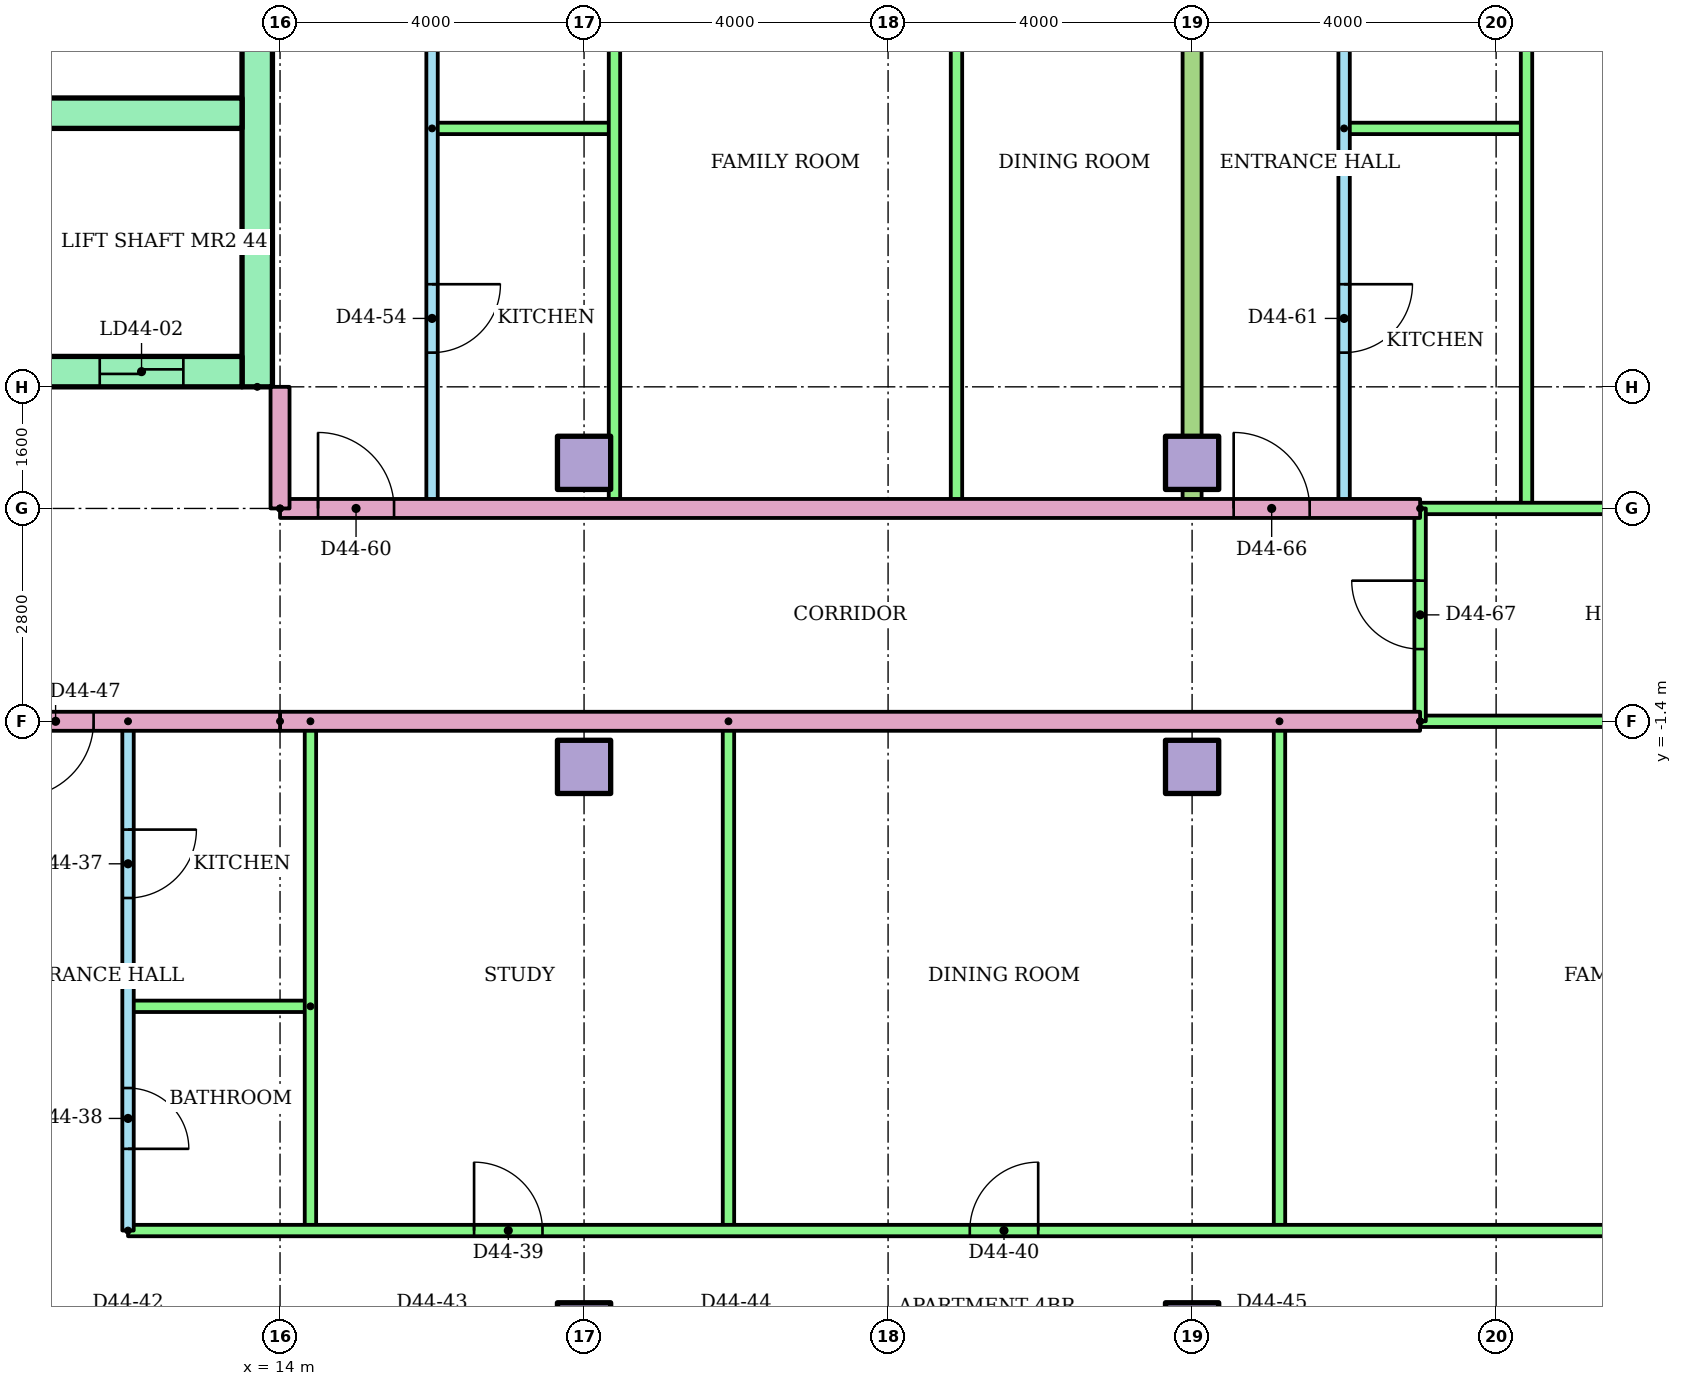
"""IFC4 building model, lengths in metres.
Left out: names, types, materials, properties, quantities, classifications, styles, units other than length and angle.
Written with IfcOpenShell. Run it as: python <this file> out.ifc"""

import sys

from ifc_helpers import new_model, si_unit, direction, frame, frame_2d, origin, origin_2d, place, context, subcontext, project, spatial, rectangle, extrude, element, fill, save


model = new_model("IFC4")
c1 = context("Model", 3, precision=1e-05, world=origin(), true_north=direction((0.0, 1.0)))
c2 = subcontext(c1, "Body", "Model", "MODEL_VIEW")
j1 = project(units=[si_unit("LENGTHUNIT", "METRE"), si_unit("PLANEANGLEUNIT", "RADIAN")], contexts=[c1])
p1 = place(None, origin())
s1 = spatial("IfcSite", under=j1, at=p1, CompositionType="ELEMENT")
p2 = place(p1, origin())
s2 = spatial("IfcBuilding", under=s1, at=p2, CompositionType="ELEMENT")
p3 = place(p2, frame((0.0, 0.0, 171.7)))
s3 = spatial("IfcBuildingStorey", under=s2, at=p3, CompositionType="ELEMENT", Elevation=171.7)
for number, where in (
    (1, (18.0, -9.4, 0.0)),
    (2, (26.0, -9.4, 0.0)),
    (3, (18.0, -2.0, 0.0)),
    (4, (26.0, -2.0, 0.0)),
    (5, (18.0, 2.0, 0.0)),
    (6, (26.0, 2.0, 0.0)),
):
    element("IfcColumn", number, at=place(p3, frame(where)), inside=s3, PredefinedType="COLUMN", context=c2, shape_type="SweptSolid", body=[
        extrude(rectangle(XDim=0.7, YDim=0.7, at=origin_2d()), origin(), (0.0, 0.0, 1.0), 3.2),
    ])
p4 = place(p3, frame((13.7, 3.0, 0.0), z_axis=(0.0, 0.0, 1.0), x_axis=(0.0, 1.0, 0.0)))
e7 = element("IfcWall", 7, at=p4, inside=s3, PredefinedType="SHEAR", context=c2, shape_type="SweptSolid", body=[
    extrude(rectangle(XDim=17.0, YDim=0.4, at=frame_2d((8.5, 0.0))), origin(), (0.0, 0.0, 1.0), 2.92),
])
p5 = place(p3, frame((-13.5, 3.2, 0.0)))
e8 = element("IfcWall", 8, at=p5, inside=s3, PredefinedType="SHEAR", context=c2, shape_type="SweptSolid", body=[
    extrude(rectangle(XDim=27.0, YDim=0.4, at=frame_2d((13.5, 0.0))), origin(), (0.0, 0.0, 1.0), 2.92),
])
p6 = place(p5, frame((22.083, 0.0, 0.0)))
e9 = element("IfcOpeningElement", 9, at=p6, cuts=e8, PredefinedType="OPENING", context=c2, shape_type="SweptSolid", body=[
    extrude(rectangle(XDim=1.1, YDim=2.1, at=frame_2d((0.55, 1.05))), frame((0.0, 0.21, 0.0), z_axis=(0.0, -1.0, 0.0), x_axis=(1.0, 0.0, 0.0)), (0.0, 0.0, 1.0), 0.42),
])
p7 = place(p5, frame((25.128, 0.0, 0.0)))
e10 = element("IfcOpeningElement", 10, at=p7, cuts=e8, PredefinedType="OPENING", context=c2, shape_type="SweptSolid", body=[
    extrude(rectangle(XDim=1.1, YDim=2.1, at=frame_2d((0.55, 1.05))), frame((0.0, 0.21, 0.0), z_axis=(0.0, -1.0, 0.0), x_axis=(1.0, 0.0, 0.0)), (0.0, 0.0, 1.0), 0.42),
])
p8 = place(p5, frame((12.6, 0.0, 0.0)))
e11 = element("IfcOpeningElement", 11, at=p8, cuts=e8, PredefinedType="OPENING", context=c2, shape_type="SweptSolid", body=[
    extrude(rectangle(XDim=1.8, YDim=2.1, at=frame_2d((0.9, 1.05))), frame((0.0, 0.21, 0.0), z_axis=(0.0, -1.0, 0.0), x_axis=(1.0, 0.0, 0.0)), (0.0, 0.0, 1.0), 0.42),
])
p9 = place(p3, frame((1.522, 6.6, 0.0)))
e12 = element("IfcWall", 12, at=p9, inside=s3, PredefinedType="SHEAR", context=c2, shape_type="SweptSolid", body=[
    extrude(rectangle(XDim=11.978, YDim=0.4, at=frame_2d((5.989, 0.0))), origin(), (0.0, 0.0, 1.0), 2.92),
])
p10 = place(p9, frame((1.022, 0.0, 0.0)))
e13 = element("IfcOpeningElement", 13, at=p10, cuts=e12, PredefinedType="OPENING", context=c2, shape_type="SweptSolid", body=[
    extrude(rectangle(XDim=1.0, YDim=2.1, at=frame_2d((0.5, 1.05))), frame((0.0, 0.21, 0.0), z_axis=(0.0, -1.0, 0.0), x_axis=(1.0, 0.0, 0.0)), (0.0, 0.0, 1.0), 0.42),
])
p11 = place(p9, frame((4.067, 0.0, 0.0)))
e14 = element("IfcOpeningElement", 14, at=p11, cuts=e12, PredefinedType="OPENING", context=c2, shape_type="SweptSolid", body=[
    extrude(rectangle(XDim=1.0, YDim=2.1, at=frame_2d((0.5, 1.05))), frame((0.0, 0.21, 0.0), z_axis=(0.0, -1.0, 0.0), x_axis=(1.0, 0.0, 0.0)), (0.0, 0.0, 1.0), 0.42),
])
p12 = place(p3, frame((12.0, -1.4, 0.0), z_axis=(0.0, 0.0, 1.0), x_axis=(0.0, -1.0, 0.0)))
e15 = element("IfcWall", 15, at=p12, inside=s3, PredefinedType="PARTITIONING", context=c2, shape_type="SweptSolid", body=[
    extrude(rectangle(XDim=6.7, YDim=0.15, at=frame_2d((3.35, 0.0))), origin(), (0.0, 0.0, 1.0), 2.4),
])
p13 = place(p12, frame((1.425, 0.0, 0.0)))
e16 = element("IfcOpeningElement", 16, at=p13, cuts=e15, PredefinedType="OPENING", context=c2, shape_type="SweptSolid", body=[
    extrude(rectangle(XDim=0.9, YDim=2.1, at=frame_2d((0.45, 1.05))), frame((0.0, 0.085, 0.0), z_axis=(0.0, -1.0, 0.0), x_axis=(1.0, 0.0, 0.0)), (0.0, 0.0, 1.0), 0.17),
])
p14 = place(p12, frame((4.825, 0.0, 0.0)))
e17 = element("IfcOpeningElement", 17, at=p14, cuts=e15, PredefinedType="OPENING", context=c2, shape_type="SweptSolid", body=[
    extrude(rectangle(XDim=0.8, YDim=2.1, at=frame_2d((0.4, 1.05))), frame((0.0, 0.085, 0.0), z_axis=(0.0, -1.0, 0.0), x_axis=(1.0, 0.0, 0.0)), (0.0, 0.0, 1.0), 0.17),
])
p15 = place(p3, frame((14.4, -5.15, 0.0), z_axis=(0.0, 0.0, 1.0), x_axis=(-1.0, 0.0, 0.0)))
e18 = element("IfcWall", 18, at=p15, inside=s3, PredefinedType="PARTITIONING", context=c2, shape_type="SweptSolid", body=[
    extrude(rectangle(XDim=2.4, YDim=0.15, at=frame_2d((1.2, 0.0))), origin(), (0.0, 0.0, 1.0), 2.4),
])
for number, where, z_axis, x_axis in (
    (19, (14.4, -1.4, 0.0), (0.0, 0.0, 1.0), (0.0, -1.0, 0.0)),
    (20, (19.9, -1.4, 0.0), (0.0, 0.0, 1.0), (0.0, -1.0, 0.0)),
    (21, (27.15, -1.4, 0.0), (0.0, 0.0, 1.0), (0.0, -1.0, 0.0)),
):
    element("IfcWall", number, at=place(p3, frame(where, z_axis=z_axis, x_axis=x_axis)), inside=s3, PredefinedType="PARTITIONING", context=c2, shape_type="SweptSolid", body=[
        extrude(rectangle(XDim=6.7, YDim=0.15, at=frame_2d((3.35, 0.0))), origin(), (0.0, 0.0, 1.0), 2.4),
    ])
p16 = place(p3, frame((12.0, -8.1, 0.0)))
e22 = element("IfcWall", 22, at=p16, inside=s3, PredefinedType="PARTITIONING", context=c2, shape_type="SweptSolid", body=[
    extrude(rectangle(XDim=24.82, YDim=0.15, at=frame_2d((12.41, 0.0))), origin(), (0.0, 0.0, 1.0), 2.4),
])
p17 = place(p16, frame((4.553, 0.0, 0.0)))
e23 = element("IfcOpeningElement", 23, at=p17, cuts=e22, PredefinedType="OPENING", context=c2, shape_type="SweptSolid", body=[
    extrude(rectangle(XDim=0.9, YDim=2.1, at=frame_2d((0.45, 1.05))), frame((0.0, 0.085, 0.0), z_axis=(0.0, -1.0, 0.0), x_axis=(1.0, 0.0, 0.0)), (0.0, 0.0, 1.0), 0.17),
])
p18 = place(p16, frame((11.075, 0.0, 0.0)))
e24 = element("IfcOpeningElement", 24, at=p18, cuts=e22, PredefinedType="OPENING", context=c2, shape_type="SweptSolid", body=[
    extrude(rectangle(XDim=0.9, YDim=2.1, at=frame_2d((0.45, 1.05))), frame((0.0, 0.085, 0.0), z_axis=(0.0, -1.0, 0.0), x_axis=(1.0, 0.0, 0.0)), (0.0, 0.0, 1.0), 0.17),
])
p19 = place(p16, frame((19.425, 0.0, 0.0)))
e25 = element("IfcOpeningElement", 25, at=p19, cuts=e22, PredefinedType="OPENING", context=c2, shape_type="SweptSolid", body=[
    extrude(rectangle(XDim=0.9, YDim=2.1, at=frame_2d((0.45, 1.05))), frame((0.0, 0.085, 0.0), z_axis=(0.0, -1.0, 0.0), x_axis=(1.0, 0.0, 0.0)), (0.0, 0.0, 1.0), 0.17),
])
p20 = place(p3, frame((29.0, -1.4, 0.0), z_axis=(0.0, 0.0, 1.0), x_axis=(-1.0, 0.0, 0.0)))
e26 = element("IfcWall", 26, at=p20, inside=s3, PredefinedType="PARTITIONING", context=c2, shape_type="SweptSolid", body=[
    extrude(rectangle(XDim=15.0, YDim=0.25, at=frame_2d((7.5, 0.0))), origin(), (0.0, 0.0, 1.0), 2.4),
])
p21 = place(p3, frame((36.82, -1.4, 0.0), z_axis=(0.0, 0.0, 1.0), x_axis=(-1.0, 0.0, 0.0)))
e27 = element("IfcWall", 27, at=p21, inside=s3, PredefinedType="PARTITIONING", context=c2, shape_type="SweptSolid", body=[
    extrude(rectangle(XDim=7.82, YDim=0.15, at=frame_2d((3.91, 0.0))), origin(), (0.0, 0.0, 1.0), 2.4),
])
p22 = place(p3, frame((16.0, 10.5, 0.0), z_axis=(0.0, 0.0, 1.0), x_axis=(0.0, -1.0, 0.0)))
e28 = element("IfcWall", 28, at=p22, inside=s3, PredefinedType="PARTITIONING", context=c2, shape_type="SweptSolid", body=[
    extrude(rectangle(XDim=9.1, YDim=0.15, at=frame_2d((4.55, 0.0))), origin(), (0.0, 0.0, 1.0), 2.4),
])
p23 = place(p22, frame((6.15, 0.0, 0.0)))
e29 = element("IfcOpeningElement", 29, at=p23, cuts=e28, PredefinedType="OPENING", context=c2, shape_type="SweptSolid", body=[
    extrude(rectangle(XDim=0.9, YDim=2.1, at=frame_2d((0.45, 1.05))), frame((0.0, 0.085, 0.0), z_axis=(0.0, -1.0, 0.0), x_axis=(1.0, 0.0, 0.0)), (0.0, 0.0, 1.0), 0.17),
])
p24 = place(p22, frame((1.65, 0.0, 0.0)))
e30 = element("IfcOpeningElement", 30, at=p24, cuts=e28, PredefinedType="OPENING", context=c2, shape_type="SweptSolid", body=[
    extrude(rectangle(XDim=0.8, YDim=2.1, at=frame_2d((0.4, 1.05))), frame((0.0, 0.085, 0.0), z_axis=(0.0, -1.0, 0.0), x_axis=(1.0, 0.0, 0.0)), (0.0, 0.0, 1.0), 0.17),
])
p25 = place(p3, frame((16.0, 6.4, 0.0)))
e31 = element("IfcWall", 31, at=p25, inside=s3, PredefinedType="PARTITIONING", context=c2, shape_type="SweptSolid", body=[
    extrude(rectangle(XDim=2.4, YDim=0.15, at=frame_2d((1.2, 0.0))), origin(), (0.0, 0.0, 1.0), 2.4),
])
for number, where, z_axis, x_axis in (
    (32, (18.4, 10.5, 0.0), (0.0, 0.0, 1.0), (0.0, -1.0, 0.0)),
    (33, (22.9, 10.5, 0.0), (0.0, 0.0, 1.0), (0.0, -1.0, 0.0)),
):
    element("IfcWall", number, at=place(p3, frame(where, z_axis=z_axis, x_axis=x_axis)), inside=s3, PredefinedType="PARTITIONING", context=c2, shape_type="SweptSolid", body=[
        extrude(rectangle(XDim=9.1, YDim=0.15, at=frame_2d((4.55, 0.0))), origin(), (0.0, 0.0, 1.0), 2.4),
    ])
p26 = place(p3, frame((28.0, 10.5, 0.0), z_axis=(0.0, 0.0, 1.0), x_axis=(0.0, -1.0, 0.0)))
e34 = element("IfcWall", 34, at=p26, inside=s3, PredefinedType="PARTITIONING", context=c2, shape_type="SweptSolid", body=[
    extrude(rectangle(XDim=9.1, YDim=0.15, at=frame_2d((4.55, 0.0))), origin(), (0.0, 0.0, 1.0), 2.4),
])
p27 = place(p26, frame((6.15, 0.0, 0.0)))
e35 = element("IfcOpeningElement", 35, at=p27, cuts=e34, PredefinedType="OPENING", context=c2, shape_type="SweptSolid", body=[
    extrude(rectangle(XDim=0.9, YDim=2.1, at=frame_2d((0.45, 1.05))), frame((0.0, 0.085, 0.0), z_axis=(0.0, -1.0, 0.0), x_axis=(1.0, 0.0, 0.0)), (0.0, 0.0, 1.0), 0.17),
])
p28 = place(p26, frame((1.65, 0.0, 0.0)))
e36 = element("IfcOpeningElement", 36, at=p28, cuts=e34, PredefinedType="OPENING", context=c2, shape_type="SweptSolid", body=[
    extrude(rectangle(XDim=0.8, YDim=2.1, at=frame_2d((0.4, 1.05))), frame((0.0, 0.085, 0.0), z_axis=(0.0, -1.0, 0.0), x_axis=(1.0, 0.0, 0.0)), (0.0, 0.0, 1.0), 0.17),
])
p29 = place(p3, frame((28.0, 6.4, 0.0)))
e37 = element("IfcWall", 37, at=p29, inside=s3, PredefinedType="PARTITIONING", context=c2, shape_type="SweptSolid", body=[
    extrude(rectangle(XDim=2.4, YDim=0.15, at=frame_2d((1.2, 0.0))), origin(), (0.0, 0.0, 1.0), 2.4),
])
p30 = place(p3, frame((30.4, 10.5, 0.0), z_axis=(0.0, 0.0, 1.0), x_axis=(0.0, -1.0, 0.0)))
e38 = element("IfcWall", 38, at=p30, inside=s3, PredefinedType="PARTITIONING", context=c2, shape_type="SweptSolid", body=[
    extrude(rectangle(XDim=9.1, YDim=0.15, at=frame_2d((4.55, 0.0))), origin(), (0.0, 0.0, 1.0), 2.4),
])
p31 = place(p3, frame((26.0, 18.821, 0.0), z_axis=(0.0, 0.0, 1.0), x_axis=(0.0, -1.0, 0.0)))
e39 = element("IfcWall", 39, at=p31, inside=s3, PredefinedType="PARTITIONING", context=c2, shape_type="SweptSolid", body=[
    extrude(rectangle(XDim=17.421, YDim=0.25, at=frame_2d((8.71, 0.0))), origin(), (0.0, 0.0, 1.0), 2.4),
])
p32 = place(p3, frame((14.0, 1.4, 0.0)))
e40 = element("IfcWall", 40, at=p32, inside=s3, PredefinedType="PARTITIONING", context=c2, shape_type="SweptSolid", body=[
    extrude(rectangle(XDim=15.0, YDim=0.25, at=frame_2d((7.5, 0.0))), origin(), (0.0, 0.0, 1.0), 2.4),
])
p33 = place(p32, frame((0.5, 0.0, 0.0)))
e41 = element("IfcOpeningElement", 41, at=p33, cuts=e40, PredefinedType="OPENING", context=c2, shape_type="SweptSolid", body=[
    extrude(rectangle(XDim=1.0, YDim=2.1, at=frame_2d((0.5, 1.05))), frame((0.0, 0.135, 0.0), z_axis=(0.0, -1.0, 0.0), x_axis=(1.0, 0.0, 0.0)), (0.0, 0.0, 1.0), 0.27),
])
p34 = place(p32, frame((12.547, 0.0, 0.0)))
e42 = element("IfcOpeningElement", 42, at=p34, cuts=e40, PredefinedType="OPENING", context=c2, shape_type="SweptSolid", body=[
    extrude(rectangle(XDim=1.0, YDim=2.1, at=frame_2d((0.5, 1.05))), frame((0.0, 0.135, 0.0), z_axis=(0.0, -1.0, 0.0), x_axis=(1.0, 0.0, 0.0)), (0.0, 0.0, 1.0), 0.27),
])
p35 = place(p3, frame((29.0, 1.4, 0.0)))
e43 = element("IfcWall", 43, at=p35, inside=s3, PredefinedType="PARTITIONING", context=c2, shape_type="SweptSolid", body=[
    extrude(rectangle(XDim=7.82, YDim=0.15, at=frame_2d((3.91, 0.0))), origin(), (0.0, 0.0, 1.0), 2.4),
])
p36 = place(p3, frame((29.0, -1.4, 0.0), z_axis=(0.0, 0.0, 1.0), x_axis=(0.0, 1.0, 0.0)))
e44 = element("IfcWall", 44, at=p36, inside=s3, PredefinedType="PARTITIONING", context=c2, shape_type="SweptSolid", body=[
    extrude(rectangle(XDim=2.8, YDim=0.15, at=frame_2d((1.4, 0.0))), origin(), (0.0, 0.0, 1.0), 2.4),
])
p37 = place(p36, frame((0.95, 0.0, 0.0)))
e45 = element("IfcOpeningElement", 45, at=p37, cuts=e44, PredefinedType="OPENING", context=c2, shape_type="SweptSolid", body=[
    extrude(rectangle(XDim=0.9, YDim=2.1, at=frame_2d((0.45, 1.05))), frame((0.0, 0.085, 0.0), z_axis=(0.0, -1.0, 0.0), x_axis=(1.0, 0.0, 0.0)), (0.0, 0.0, 1.0), 0.17),
])
p38 = place(p3, frame((14.0, -1.4, 0.0), z_axis=(0.0, 0.0, 1.0), x_axis=(-1.0, 0.0, 0.0)))
e46 = element("IfcWall", 46, at=p38, inside=s3, PredefinedType="PARTITIONING", context=c2, shape_type="SweptSolid", body=[
    extrude(rectangle(XDim=28.0, YDim=0.25, at=frame_2d((14.0, 0.0))), origin(), (0.0, 0.0, 1.0), 2.4),
])
p39 = place(p38, frame((20.547, 0.0, 0.0)))
e47 = element("IfcOpeningElement", 47, at=p39, cuts=e46, PredefinedType="OPENING", context=c2, shape_type="SweptSolid", body=[
    extrude(rectangle(XDim=1.0, YDim=2.1, at=frame_2d((0.5, 1.05))), frame((0.0, 0.135, 0.0), z_axis=(0.0, -1.0, 0.0), x_axis=(1.0, 0.0, 0.0)), (0.0, 0.0, 1.0), 0.27),
])
p40 = place(p38, frame((18.453, 0.0, 0.0)))
e48 = element("IfcOpeningElement", 48, at=p40, cuts=e46, PredefinedType="OPENING", context=c2, shape_type="SweptSolid", body=[
    extrude(rectangle(XDim=1.0, YDim=2.1, at=frame_2d((0.5, 1.05))), frame((0.0, 0.135, 0.0), z_axis=(0.0, -1.0, 0.0), x_axis=(1.0, 0.0, 0.0)), (0.0, 0.0, 1.0), 0.27),
])
p41 = place(p38, frame((2.453, 0.0, 0.0)))
e49 = element("IfcOpeningElement", 49, at=p41, cuts=e46, PredefinedType="OPENING", context=c2, shape_type="SweptSolid", body=[
    extrude(rectangle(XDim=1.0, YDim=2.1, at=frame_2d((0.5, 1.05))), frame((0.0, 0.135, 0.0), z_axis=(0.0, -1.0, 0.0), x_axis=(1.0, 0.0, 0.0)), (0.0, 0.0, 1.0), 0.27),
])
p42 = place(p3, frame((14.0, 1.4, 0.0), z_axis=(0.0, 0.0, 1.0), x_axis=(0.0, 1.0, 0.0)))
e50 = element("IfcWall", 50, at=p42, inside=s3, PredefinedType="PARTITIONING", context=c2, shape_type="SweptSolid", body=[
    extrude(rectangle(XDim=1.6, YDim=0.25, at=frame_2d((0.8, 0.0))), origin(), (0.0, 0.0, 1.0), 2.4),
])
p43 = place(p7, origin())
e51 = element("IfcDoor", 51, at=p43, inside=s3, OperationType="SLIDING_TO_LEFT", PredefinedType="DOOR", context=c2, shape_type="SweptSolid", body=[
    extrude(rectangle(XDim=1.1, YDim=2.1, at=frame_2d((0.55, 1.05))), frame((0.0, 0.025, 0.0), z_axis=(0.0, -1.0, 0.0), x_axis=(1.0, 0.0, 0.0)), (0.0, 0.0, 1.0), 0.05),
])
fill(e10, e51)
p44 = place(p13, origin())
e52 = element("IfcDoor", 52, at=p44, inside=s3, OperationType="SINGLE_SWING_LEFT", PredefinedType="DOOR", context=c2, shape_type="SweptSolid", body=[
    extrude(rectangle(XDim=0.9, YDim=2.1, at=frame_2d((0.45, 1.05))), frame((0.0, 0.025, 0.0), z_axis=(0.0, -1.0, 0.0), x_axis=(1.0, 0.0, 0.0)), (0.0, 0.0, 1.0), 0.05),
])
fill(e16, e52)
p45 = place(p14, origin())
e53 = element("IfcDoor", 53, at=p45, inside=s3, OperationType="SINGLE_SWING_RIGHT", PredefinedType="DOOR", context=c2, shape_type="SweptSolid", body=[
    extrude(rectangle(XDim=0.8, YDim=2.1, at=frame_2d((0.4, 1.05))), frame((0.0, 0.025, 0.0), z_axis=(0.0, -1.0, 0.0), x_axis=(1.0, 0.0, 0.0)), (0.0, 0.0, 1.0), 0.05),
])
fill(e17, e53)
p46 = place(p17, origin())
e54 = element("IfcDoor", 54, at=p46, inside=s3, OperationType="SINGLE_SWING_LEFT", PredefinedType="DOOR", context=c2, shape_type="SweptSolid", body=[
    extrude(rectangle(XDim=0.9, YDim=2.1, at=frame_2d((0.45, 1.05))), frame((0.0, 0.025, 0.0), z_axis=(0.0, -1.0, 0.0), x_axis=(1.0, 0.0, 0.0)), (0.0, 0.0, 1.0), 0.05),
])
fill(e23, e54)
p47 = place(p18, origin())
e55 = element("IfcDoor", 55, at=p47, inside=s3, OperationType="SINGLE_SWING_RIGHT", PredefinedType="DOOR", context=c2, shape_type="SweptSolid", body=[
    extrude(rectangle(XDim=0.9, YDim=2.1, at=frame_2d((0.45, 1.05))), frame((0.0, 0.025, 0.0), z_axis=(0.0, -1.0, 0.0), x_axis=(1.0, 0.0, 0.0)), (0.0, 0.0, 1.0), 0.05),
])
fill(e24, e55)
p48 = place(p41, origin())
e56 = element("IfcDoor", 56, at=p48, inside=s3, OperationType="SINGLE_SWING_RIGHT", PredefinedType="DOOR", context=c2, shape_type="SweptSolid", body=[
    extrude(rectangle(XDim=1.0, YDim=2.1, at=frame_2d((0.5, 1.05))), frame((0.0, 0.025, 0.0), z_axis=(0.0, -1.0, 0.0), x_axis=(1.0, 0.0, 0.0)), (0.0, 0.0, 1.0), 0.05),
])
fill(e49, e56)
p49 = place(p23, origin())
e57 = element("IfcDoor", 57, at=p49, inside=s3, OperationType="SINGLE_SWING_LEFT", PredefinedType="DOOR", context=c2, shape_type="SweptSolid", body=[
    extrude(rectangle(XDim=0.9, YDim=2.1, at=frame_2d((0.45, 1.05))), frame((0.0, 0.025, 0.0), z_axis=(0.0, -1.0, 0.0), x_axis=(1.0, 0.0, 0.0)), (0.0, 0.0, 1.0), 0.05),
])
fill(e29, e57)
p50 = place(p33, origin())
e58 = element("IfcDoor", 58, at=p50, inside=s3, OperationType="SINGLE_SWING_LEFT", PredefinedType="DOOR", context=c2, shape_type="SweptSolid", body=[
    extrude(rectangle(XDim=1.0, YDim=2.1, at=frame_2d((0.5, 1.05))), frame((0.0, 0.025, 0.0), z_axis=(0.0, -1.0, 0.0), x_axis=(1.0, 0.0, 0.0)), (0.0, 0.0, 1.0), 0.05),
])
fill(e41, e58)
p51 = place(p27, origin())
e59 = element("IfcDoor", 59, at=p51, inside=s3, OperationType="SINGLE_SWING_LEFT", PredefinedType="DOOR", context=c2, shape_type="SweptSolid", body=[
    extrude(rectangle(XDim=0.9, YDim=2.1, at=frame_2d((0.45, 1.05))), frame((0.0, 0.025, 0.0), z_axis=(0.0, -1.0, 0.0), x_axis=(1.0, 0.0, 0.0)), (0.0, 0.0, 1.0), 0.05),
])
fill(e35, e59)
p52 = place(p34, origin())
e60 = element("IfcDoor", 60, at=p52, inside=s3, OperationType="SINGLE_SWING_LEFT", PredefinedType="DOOR", context=c2, shape_type="SweptSolid", body=[
    extrude(rectangle(XDim=1.0, YDim=2.1, at=frame_2d((0.5, 1.05))), frame((0.0, 0.025, 0.0), z_axis=(0.0, -1.0, 0.0), x_axis=(1.0, 0.0, 0.0)), (0.0, 0.0, 1.0), 0.05),
])
fill(e42, e60)
p53 = place(p37, origin())
e61 = element("IfcDoor", 61, at=p53, inside=s3, OperationType="SINGLE_SWING_RIGHT", PredefinedType="DOOR", context=c2, shape_type="SweptSolid", body=[
    extrude(rectangle(XDim=0.9, YDim=2.1, at=frame_2d((0.45, 1.05))), frame((0.0, 0.025, 0.0), z_axis=(0.0, -1.0, 0.0), x_axis=(1.0, 0.0, 0.0)), (0.0, 0.0, 1.0), 0.05),
])
fill(e45, e61)
save(model, sys.argv[1])
